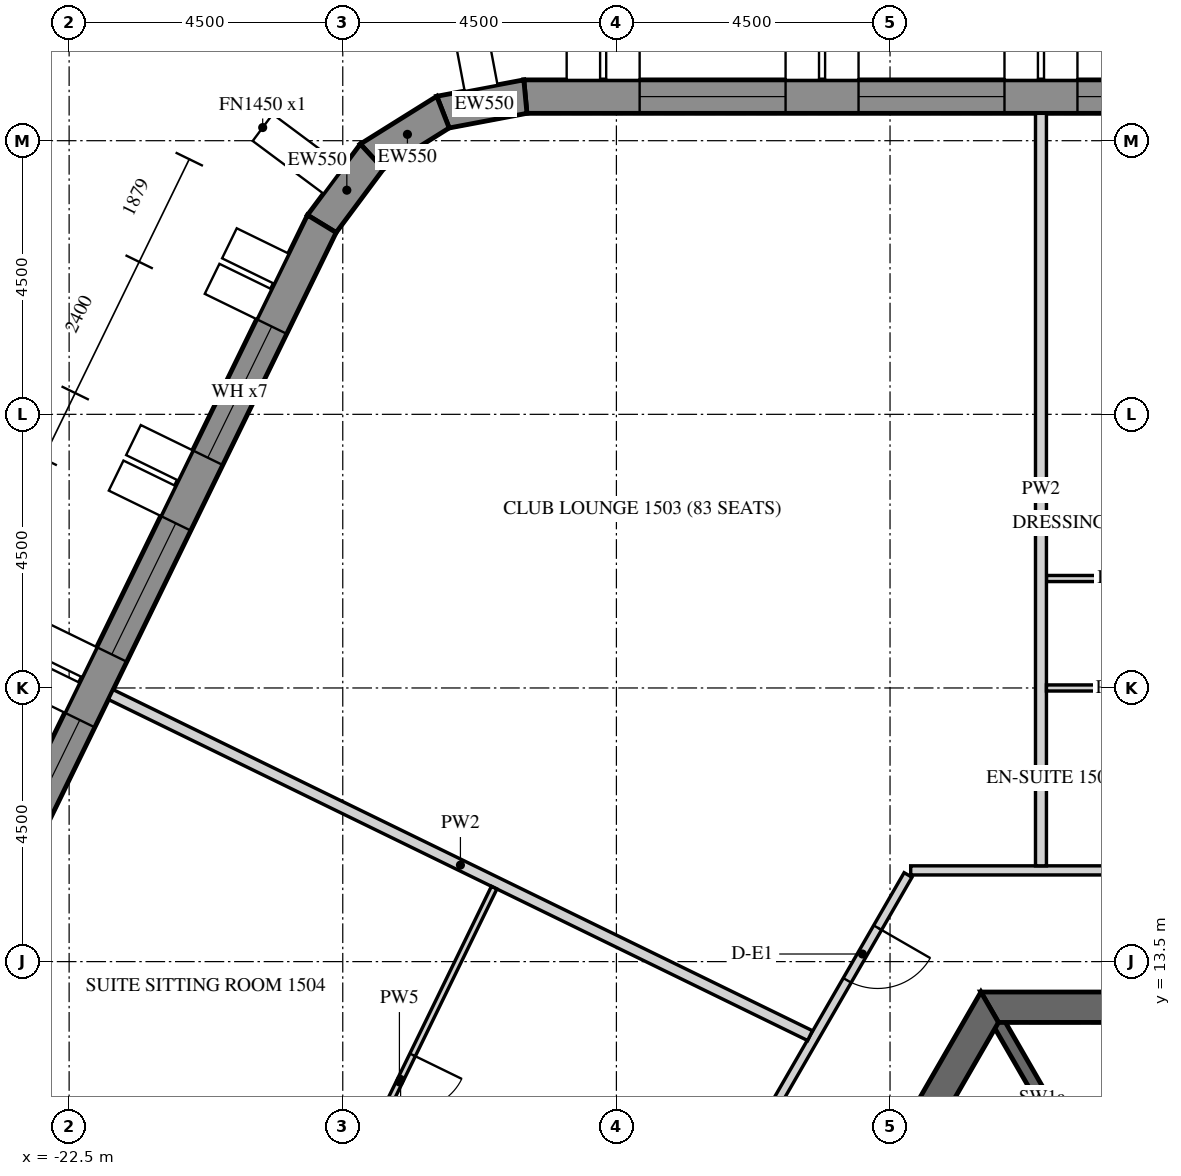
"""IFC4 building model, lengths in metres.
Left out: names, types, materials, properties, quantities, classifications, styles, units other than length and angle.
Written with IfcOpenShell. Run it as: python <this file> out.ifc"""

import sys

from ifc_helpers import new_model, si_unit, direction, frame, frame_2d, origin, place, context, subcontext, project, spatial, polyline, rectangle, outline, extrude, element, fill, save


model = new_model("IFC4")
c1 = context("Model", 3, precision=1e-05, world=origin(), true_north=direction((0.0, 1.0)))
c2 = subcontext(c1, "Body", "Model", "MODEL_VIEW")
j1 = project(units=[si_unit("LENGTHUNIT", "METRE"), si_unit("PLANEANGLEUNIT", "RADIAN")], contexts=[c1])
p1 = place(None, origin())
s1 = spatial("IfcSite", under=j1, at=p1, CompositionType="ELEMENT")
p2 = place(p1, origin())
s2 = spatial("IfcBuilding", under=s1, at=p2, CompositionType="ELEMENT")
p3 = place(p2, frame((0.0, 0.0, 195.6)))
s3 = spatial("IfcBuildingStorey", under=s2, at=p3, CompositionType="ELEMENT", Elevation=195.6)
p4 = place(p3, frame((12.761, 27.725, -0.15), z_axis=(0.0, 0.0, 1.0), x_axis=(-1.0, 0.0, 0.0)))
e1 = element("IfcWall", 1, at=p4, inside=s3, PredefinedType="SOLIDWALL", context=c2, shape_type="SweptSolid", body=[
    extrude(outline(polyline([(-0.022, -0.275), (27.783, -0.275), (27.732, 0.275), (0.022, 0.275), (-0.022, -0.275)])), origin(), (0.0, 0.0, 1.0), 3.9),
])
p5 = place(p4, frame((1.879, 0.0, 1.05)))
e2 = element("IfcOpeningElement", 2, at=p5, cuts=e1, PredefinedType="OPENING", context=c2, shape_type="SweptSolid", body=[
    extrude(rectangle(XDim=2.4, YDim=2.4, at=frame_2d((1.2, 1.2))), frame((0.0, 0.285, 0.0), z_axis=(0.0, -1.0, 0.0), x_axis=(1.0, 0.0, 0.0)), (0.0, 0.0, 1.0), 0.57),
])
p6 = place(p4, frame((5.479, 0.0, 1.05)))
e3 = element("IfcOpeningElement", 3, at=p6, cuts=e1, PredefinedType="OPENING", context=c2, shape_type="SweptSolid", body=[
    extrude(rectangle(XDim=2.4, YDim=2.4, at=frame_2d((1.2, 1.2))), frame((0.0, 0.285, 0.0), z_axis=(0.0, -1.0, 0.0), x_axis=(1.0, 0.0, 0.0)), (0.0, 0.0, 1.0), 0.57),
])
p7 = place(p4, frame((9.079, 0.0, 1.05)))
e4 = element("IfcOpeningElement", 4, at=p7, cuts=e1, PredefinedType="OPENING", context=c2, shape_type="SweptSolid", body=[
    extrude(rectangle(XDim=2.4, YDim=2.4, at=frame_2d((1.2, 1.2))), frame((0.0, 0.285, 0.0), z_axis=(0.0, -1.0, 0.0), x_axis=(1.0, 0.0, 0.0)), (0.0, 0.0, 1.0), 0.57),
])
p8 = place(p4, frame((12.679, 0.0, 1.05)))
e5 = element("IfcOpeningElement", 5, at=p8, cuts=e1, PredefinedType="OPENING", context=c2, shape_type="SweptSolid", body=[
    extrude(rectangle(XDim=2.4, YDim=2.4, at=frame_2d((1.2, 1.2))), frame((0.0, 0.285, 0.0), z_axis=(0.0, -1.0, 0.0), x_axis=(1.0, 0.0, 0.0)), (0.0, 0.0, 1.0), 0.57),
])
p9 = place(p4, frame((16.279, 0.0, 1.05)))
e6 = element("IfcOpeningElement", 6, at=p9, cuts=e1, PredefinedType="OPENING", context=c2, shape_type="SweptSolid", body=[
    extrude(rectangle(XDim=2.4, YDim=2.4, at=frame_2d((1.2, 1.2))), frame((0.0, 0.285, 0.0), z_axis=(0.0, -1.0, 0.0), x_axis=(1.0, 0.0, 0.0)), (0.0, 0.0, 1.0), 0.57),
])
p10 = place(p4, frame((19.879, 0.0, 1.05)))
e7 = element("IfcOpeningElement", 7, at=p10, cuts=e1, PredefinedType="OPENING", context=c2, shape_type="SweptSolid", body=[
    extrude(rectangle(XDim=2.4, YDim=2.4, at=frame_2d((1.2, 1.2))), frame((0.0, 0.285, 0.0), z_axis=(0.0, -1.0, 0.0), x_axis=(1.0, 0.0, 0.0)), (0.0, 0.0, 1.0), 0.57),
])
p11 = place(p4, frame((23.479, 0.0, 1.05)))
e8 = element("IfcOpeningElement", 8, at=p11, cuts=e1, PredefinedType="OPENING", context=c2, shape_type="SweptSolid", body=[
    extrude(rectangle(XDim=2.4, YDim=2.4, at=frame_2d((1.2, 1.2))), frame((0.0, 0.285, 0.0), z_axis=(0.0, -1.0, 0.0), x_axis=(1.0, 0.0, 0.0)), (0.0, 0.0, 1.0), 0.57),
])
p12 = place(p3, frame((-14.997, 27.725, -0.15), z_axis=(0.0, 0.0, 1.0), x_axis=(-0.982705443133, -0.185175624845, 0.0)))
e9 = element("IfcWall", 9, at=p12, inside=s3, PredefinedType="SOLIDWALL", context=c2, shape_type="SweptSolid", body=[
    extrude(outline(polyline([(-0.026, -0.275), (1.431, -0.275), (1.327, 0.275), (0.026, 0.275), (-0.026, -0.275)])), origin(), (0.0, 0.0, 1.0), 3.9),
])
p13 = place(p3, frame((-16.352, 27.47, -0.15), z_axis=(0.0, 0.0, 1.0), x_axis=(-0.848057977594, -0.5299034503, 0.0)))
e10 = element("IfcWall", 10, at=p13, inside=s3, PredefinedType="SOLIDWALL", context=c2, shape_type="SweptSolid", body=[
    extrude(outline(polyline([(-0.052, -0.275), (1.431, -0.275), (1.327, 0.275), (0.052, 0.275), (-0.052, -0.275)])), origin(), (0.0, 0.0, 1.0), 3.9),
])
p14 = place(p3, frame((-17.521, 26.739, -0.15), z_axis=(0.0, 0.0, 1.0), x_axis=(-0.597135295884, -0.802140535324, 0.0)))
e11 = element("IfcWall", 11, at=p14, inside=s3, PredefinedType="SOLIDWALL", context=c2, shape_type="SweptSolid", body=[
    extrude(outline(polyline([(-0.052, -0.275), (1.405, -0.275), (1.354, 0.275), (0.052, 0.275), (-0.052, -0.275)])), origin(), (0.0, 0.0, 1.0), 3.9),
])
p15 = place(p3, frame((-18.345, 25.633, -0.15), z_axis=(0.0, 0.0, 1.0), x_axis=(-0.43837181828, -0.898793718791, 0.0)))
e12 = element("IfcWall", 12, at=p15, inside=s3, PredefinedType="SOLIDWALL", context=c2, shape_type="SweptSolid", body=[
    extrude(outline(polyline([(-0.026, -0.275), (27.78, -0.275), (27.735, 0.275), (0.026, 0.275), (-0.026, -0.275)])), origin(), (0.0, 0.0, 1.0), 3.9),
])
p16 = place(p15, frame((1.879, 0.0, 1.05)))
e13 = element("IfcOpeningElement", 13, at=p16, cuts=e12, PredefinedType="OPENING", context=c2, shape_type="SweptSolid", body=[
    extrude(rectangle(XDim=2.4, YDim=2.4, at=frame_2d((1.2, 1.2))), frame((0.0, 0.285, 0.0), z_axis=(0.0, -1.0, 0.0), x_axis=(1.0, 0.0, 0.0)), (0.0, 0.0, 1.0), 0.57),
])
p17 = place(p15, frame((5.479, 0.0, 1.05)))
e14 = element("IfcOpeningElement", 14, at=p17, cuts=e12, PredefinedType="OPENING", context=c2, shape_type="SweptSolid", body=[
    extrude(rectangle(XDim=2.4, YDim=2.4, at=frame_2d((1.2, 1.2))), frame((0.0, 0.285, 0.0), z_axis=(0.0, -1.0, 0.0), x_axis=(1.0, 0.0, 0.0)), (0.0, 0.0, 1.0), 0.57),
])
p18 = place(p15, frame((9.079, 0.0, 1.05)))
e15 = element("IfcOpeningElement", 15, at=p18, cuts=e12, PredefinedType="OPENING", context=c2, shape_type="SweptSolid", body=[
    extrude(rectangle(XDim=2.4, YDim=2.4, at=frame_2d((1.2, 1.2))), frame((0.0, 0.285, 0.0), z_axis=(0.0, -1.0, 0.0), x_axis=(1.0, 0.0, 0.0)), (0.0, 0.0, 1.0), 0.57),
])
p19 = place(p15, frame((12.679, 0.0, 1.05)))
e16 = element("IfcOpeningElement", 16, at=p19, cuts=e12, PredefinedType="OPENING", context=c2, shape_type="SweptSolid", body=[
    extrude(rectangle(XDim=2.4, YDim=2.4, at=frame_2d((1.2, 1.2))), frame((0.0, 0.285, 0.0), z_axis=(0.0, -1.0, 0.0), x_axis=(1.0, 0.0, 0.0)), (0.0, 0.0, 1.0), 0.57),
])
p20 = place(p15, frame((16.279, 0.0, 1.05)))
e17 = element("IfcOpeningElement", 17, at=p20, cuts=e12, PredefinedType="OPENING", context=c2, shape_type="SweptSolid", body=[
    extrude(rectangle(XDim=2.4, YDim=2.4, at=frame_2d((1.2, 1.2))), frame((0.0, 0.285, 0.0), z_axis=(0.0, -1.0, 0.0), x_axis=(1.0, 0.0, 0.0)), (0.0, 0.0, 1.0), 0.57),
])
p21 = place(p15, frame((19.879, 0.0, 1.05)))
e18 = element("IfcOpeningElement", 18, at=p21, cuts=e12, PredefinedType="OPENING", context=c2, shape_type="SweptSolid", body=[
    extrude(rectangle(XDim=2.4, YDim=2.4, at=frame_2d((1.2, 1.2))), frame((0.0, 0.285, 0.0), z_axis=(0.0, -1.0, 0.0), x_axis=(1.0, 0.0, 0.0)), (0.0, 0.0, 1.0), 0.57),
])
p22 = place(p15, frame((23.479, 0.0, 1.05)))
e19 = element("IfcOpeningElement", 19, at=p22, cuts=e12, PredefinedType="OPENING", context=c2, shape_type="SweptSolid", body=[
    extrude(rectangle(XDim=2.4, YDim=2.4, at=frame_2d((1.2, 1.2))), frame((0.0, 0.285, 0.0), z_axis=(0.0, -1.0, 0.0), x_axis=(1.0, 0.0, 0.0)), (0.0, 0.0, 1.0), 0.57),
])
p23 = place(p3, frame((-7.361, 12.75, -0.15), z_axis=(0.0, 0.0, 1.0), x_axis=(-0.50000571537, -0.866022103989, 0.0)))
e20 = element("IfcWall", 20, at=p23, inside=s3, PredefinedType="SHEAR", context=c2, shape_type="SweptSolid", body=[
    extrude(outline(polyline([(-0.144, -0.25), (14.867, -0.25), (14.578, 0.25), (0.144, 0.25), (-0.144, -0.25)])), origin(), (0.0, 0.0, 1.0), 3.9),
])
p24 = place(p23, frame((6.49, 0.0, 0.15)))
e21 = element("IfcOpeningElement", 21, at=p24, cuts=e20, PredefinedType="OPENING", context=c2, shape_type="SweptSolid", body=[
    extrude(rectangle(XDim=1.8, YDim=2.4, at=frame_2d((0.9, 1.2))), frame((0.0, 0.26, 0.0), z_axis=(0.0, -1.0, 0.0), x_axis=(1.0, 0.0, 0.0)), (0.0, 0.0, 1.0), 0.52),
])
p25 = place(p3, frame((7.361, 12.75, -0.15), z_axis=(0.0, 0.0, 1.0), x_axis=(-1.0, 0.0, 0.0)))
e22 = element("IfcWall", 22, at=p25, inside=s3, PredefinedType="SHEAR", context=c2, shape_type="SweptSolid", body=[
    extrude(outline(polyline([(-0.144, -0.25), (14.866, -0.25), (14.578, 0.25), (0.144, 0.25), (-0.144, -0.25)])), origin(), (0.0, 0.0, 1.0), 3.9),
])
p26 = place(p25, frame((6.761, 0.0, 0.15)))
e23 = element("IfcOpeningElement", 23, at=p26, cuts=e22, PredefinedType="OPENING", context=c2, shape_type="SweptSolid", body=[
    extrude(rectangle(XDim=1.2, YDim=2.4, at=frame_2d((0.6, 1.2))), frame((0.0, 0.26, 0.0), z_axis=(0.0, -1.0, 0.0), x_axis=(1.0, 0.0, 0.0)), (0.0, 0.0, 1.0), 0.52),
])
p27 = place(p3, frame((-5.773, 10.0, -0.15), z_axis=(0.0, 0.0, 1.0), x_axis=(-0.499995765644, 0.866027848477, 0.0)))
e24 = element("IfcWall", 24, at=p27, inside=s3, PredefinedType="SHEAR", context=c2, shape_type="SweptSolid", body=[
    extrude(rectangle(XDim=2.887, YDim=0.2, at=frame_2d((1.443, 0.0))), origin(), (0.0, 0.0, 1.0), 3.9),
])
p28 = place(p3, frame((4.207, 15.0, 0.0), z_axis=(0.0, 0.0, 1.0), x_axis=(-1.0, 0.0, 0.0)))
e25 = element("IfcWall", 25, at=p28, inside=s3, PredefinedType="PARTITIONING", context=c2, shape_type="SweptSolid", body=[
    extrude(rectangle(XDim=12.867, YDim=0.15, at=frame_2d((6.434, 0.0))), origin(), (0.0, 0.0, 1.0), 2.988),
])
p29 = place(p28, frame((3.625, 0.0, 0.0)))
e26 = element("IfcOpeningElement", 26, at=p29, cuts=e25, PredefinedType="OPENING", context=c2, shape_type="SweptSolid", body=[
    extrude(rectangle(XDim=1.0, YDim=2.1, at=frame_2d((0.5, 1.05))), frame((0.0, 0.085, 0.0), z_axis=(0.0, -1.0, 0.0), x_axis=(1.0, 0.0, 0.0)), (0.0, 0.0, 1.0), 0.17),
])
p30 = place(p3, frame((-8.704, 14.925, 0.0), z_axis=(0.0, 0.0, 1.0), x_axis=(-0.500001272756, -0.866024668957, 0.0)))
e27 = element("IfcWall", 27, at=p30, inside=s3, PredefinedType="PARTITIONING", context=c2, shape_type="SweptSolid", body=[
    extrude(rectangle(XDim=14.78, YDim=0.15, at=frame_2d((7.39, 0.0))), origin(), (0.0, 0.0, 1.0), 2.988),
])
p31 = place(p30, frame((1.001, 0.0, 0.0)))
e28 = element("IfcOpeningElement", 28, at=p31, cuts=e27, PredefinedType="OPENING", context=c2, shape_type="SweptSolid", body=[
    extrude(rectangle(XDim=1.0, YDim=2.1, at=frame_2d((0.5, 1.05))), frame((0.0, 0.085, 0.0), z_axis=(0.0, -1.0, 0.0), x_axis=(1.0, 0.0, 0.0)), (0.0, 0.0, 1.0), 0.17),
])
p32 = place(p30, frame((7.281, 0.0, 0.0)))
e29 = element("IfcOpeningElement", 29, at=p32, cuts=e27, PredefinedType="OPENING", context=c2, shape_type="SweptSolid", body=[
    extrude(rectangle(XDim=1.0, YDim=2.1, at=frame_2d((0.5, 1.05))), frame((0.0, 0.085, 0.0), z_axis=(0.0, -1.0, 0.0), x_axis=(1.0, 0.0, 0.0)), (0.0, 0.0, 1.0), 0.17),
])
p33 = place(p3, frame((-6.428, 19.8, 0.0), z_axis=(0.0, 0.0, 1.0), x_axis=(1.0, 0.0, 0.0)))
e30 = element("IfcWall", 30, at=p33, inside=s3, PredefinedType="PARTITIONING", context=c2, shape_type="SweptSolid", body=[
    extrude(rectangle(XDim=2.31, YDim=0.1, at=frame_2d((1.155, 0.0))), origin(), (0.0, 0.0, 1.0), 2.988),
])
p34 = place(p3, frame((-6.518, 27.45, 0.0), z_axis=(0.0, 0.0, 1.0), x_axis=(0.0, -1.0, 0.0)))
e31 = element("IfcWall", 31, at=p34, inside=s3, PredefinedType="PARTITIONING", context=c2, shape_type="SweptSolid", body=[
    extrude(rectangle(XDim=12.375, YDim=0.18, at=frame_2d((6.188, 0.0))), origin(), (0.0, 0.0, 1.0), 2.988),
])
p35 = place(p3, frame((-4.168, 18.0, 0.0), z_axis=(0.0, 0.0, 1.0), x_axis=(-1.0, 0.0, 0.0)))
e32 = element("IfcWall", 32, at=p35, inside=s3, PredefinedType="PARTITIONING", context=c2, shape_type="SweptSolid", body=[
    extrude(rectangle(XDim=2.26, YDim=0.1, at=frame_2d((1.13, 0.0))), origin(), (0.0, 0.0, 1.0), 2.988),
])
p36 = place(p3, frame((-21.815, 17.892, 0.0), z_axis=(0.0, 0.0, 1.0), x_axis=(0.898799253997, -0.438360469265, 0.0)))
e33 = element("IfcWall", 33, at=p36, inside=s3, PredefinedType="PARTITIONING", context=c2, shape_type="SweptSolid", body=[
    extrude(rectangle(XDim=12.794, YDim=0.18, at=frame_2d((6.397, 0.0))), origin(), (0.0, 0.0, 1.0), 2.988),
])
p37 = place(p3, frame((-15.51, 14.717, 0.0), z_axis=(0.0, 0.0, 1.0), x_axis=(-0.438387776054, -0.898785935475, 0.0)))
e34 = element("IfcWall", 34, at=p37, inside=s3, PredefinedType="PARTITIONING", context=c2, shape_type="SweptSolid", body=[
    extrude(rectangle(XDim=7.11, YDim=0.1, at=frame_2d((3.555, 0.0))), origin(), (0.0, 0.0, 1.0), 2.988),
])
p38 = place(p37, frame((3.06, 0.0, 0.0)))
e35 = element("IfcOpeningElement", 35, at=p38, cuts=e34, PredefinedType="OPENING", context=c2, shape_type="SweptSolid", body=[
    extrude(rectangle(XDim=0.9, YDim=2.1, at=frame_2d((0.45, 1.05))), frame((0.0, 0.06, 0.0), z_axis=(0.0, -1.0, 0.0), x_axis=(1.0, 0.0, 0.0)), (0.0, 0.0, 1.0), 0.12),
])
p39 = place(p3, frame((-18.672, 8.348, 0.0), z_axis=(0.0, 0.0, 1.0), x_axis=(-0.898793888698, 0.438371469919, 0.0)))
e36 = element("IfcWall", 36, at=p39, inside=s3, PredefinedType="PARTITIONING", context=c2, shape_type="SweptSolid", body=[
    extrude(rectangle(XDim=7.008, YDim=0.1, at=frame_2d((3.504, 0.0))), origin(), (0.0, 0.0, 1.0), 2.988),
])
p40 = place(p9, frame((0.0, 0.205, 0.0)))
e37 = element("IfcWindow", 37, at=p40, inside=s3, PartitioningType="DOUBLE_PANEL_VERTICAL", PredefinedType="WINDOW", context=c2, shape_type="SweptSolid", body=[
    extrude(rectangle(XDim=2.4, YDim=2.4, at=frame_2d((1.2, 1.2))), frame((0.0, 0.03, 0.0), z_axis=(0.0, -1.0, 0.0), x_axis=(1.0, 0.0, 0.0)), (0.0, 0.0, 1.0), 0.06),
])
fill(e6, e37)
p41 = place(p10, frame((0.0, 0.205, 0.0)))
e38 = element("IfcWindow", 38, at=p41, inside=s3, PartitioningType="DOUBLE_PANEL_VERTICAL", PredefinedType="WINDOW", context=c2, shape_type="SweptSolid", body=[
    extrude(rectangle(XDim=2.4, YDim=2.4, at=frame_2d((1.2, 1.2))), frame((0.0, 0.03, 0.0), z_axis=(0.0, -1.0, 0.0), x_axis=(1.0, 0.0, 0.0)), (0.0, 0.0, 1.0), 0.06),
])
fill(e7, e38)
p42 = place(p11, frame((0.0, 0.205, 0.0)))
e39 = element("IfcWindow", 39, at=p42, inside=s3, PartitioningType="DOUBLE_PANEL_VERTICAL", PredefinedType="WINDOW", context=c2, shape_type="SweptSolid", body=[
    extrude(rectangle(XDim=2.4, YDim=2.4, at=frame_2d((1.2, 1.2))), frame((0.0, 0.03, 0.0), z_axis=(0.0, -1.0, 0.0), x_axis=(1.0, 0.0, 0.0)), (0.0, 0.0, 1.0), 0.06),
])
fill(e8, e39)
p43 = place(p16, frame((0.0, 0.205, 0.0)))
e40 = element("IfcWindow", 40, at=p43, inside=s3, PartitioningType="DOUBLE_PANEL_VERTICAL", PredefinedType="WINDOW", context=c2, shape_type="SweptSolid", body=[
    extrude(rectangle(XDim=2.4, YDim=2.4, at=frame_2d((1.2, 1.2))), frame((0.0, 0.03, 0.0), z_axis=(0.0, -1.0, 0.0), x_axis=(1.0, 0.0, 0.0)), (0.0, 0.0, 1.0), 0.06),
])
fill(e13, e40)
p44 = place(p17, frame((0.0, 0.205, 0.0)))
e41 = element("IfcWindow", 41, at=p44, inside=s3, PartitioningType="DOUBLE_PANEL_VERTICAL", PredefinedType="WINDOW", context=c2, shape_type="SweptSolid", body=[
    extrude(rectangle(XDim=2.4, YDim=2.4, at=frame_2d((1.2, 1.2))), frame((0.0, 0.03, 0.0), z_axis=(0.0, -1.0, 0.0), x_axis=(1.0, 0.0, 0.0)), (0.0, 0.0, 1.0), 0.06),
])
fill(e14, e41)
p45 = place(p18, frame((0.0, 0.205, 0.0)))
e42 = element("IfcWindow", 42, at=p45, inside=s3, PartitioningType="DOUBLE_PANEL_VERTICAL", PredefinedType="WINDOW", context=c2, shape_type="SweptSolid", body=[
    extrude(rectangle(XDim=2.4, YDim=2.4, at=frame_2d((1.2, 1.2))), frame((0.0, 0.03, 0.0), z_axis=(0.0, -1.0, 0.0), x_axis=(1.0, 0.0, 0.0)), (0.0, 0.0, 1.0), 0.06),
])
fill(e15, e42)
p46 = place(p31, origin())
e43 = element("IfcDoor", 43, at=p46, inside=s3, OperationType="SINGLE_SWING_RIGHT", PredefinedType="DOOR", context=c2, shape_type="SweptSolid", body=[
    extrude(rectangle(XDim=1.0, YDim=2.1, at=frame_2d((0.5, 1.05))), frame((0.0, 0.025, 0.0), z_axis=(0.0, -1.0, 0.0), x_axis=(1.0, 0.0, 0.0)), (0.0, 0.0, 1.0), 0.05),
])
fill(e28, e43)
p47 = place(p38, origin())
e44 = element("IfcDoor", 44, at=p47, inside=s3, OperationType="SINGLE_SWING_RIGHT", PredefinedType="DOOR", context=c2, shape_type="SweptSolid", body=[
    extrude(rectangle(XDim=0.9, YDim=2.1, at=frame_2d((0.45, 1.05))), frame((0.0, 0.025, 0.0), z_axis=(0.0, -1.0, 0.0), x_axis=(1.0, 0.0, 0.0)), (0.0, 0.0, 1.0), 0.05),
])
fill(e35, e44)
save(model, sys.argv[1])
